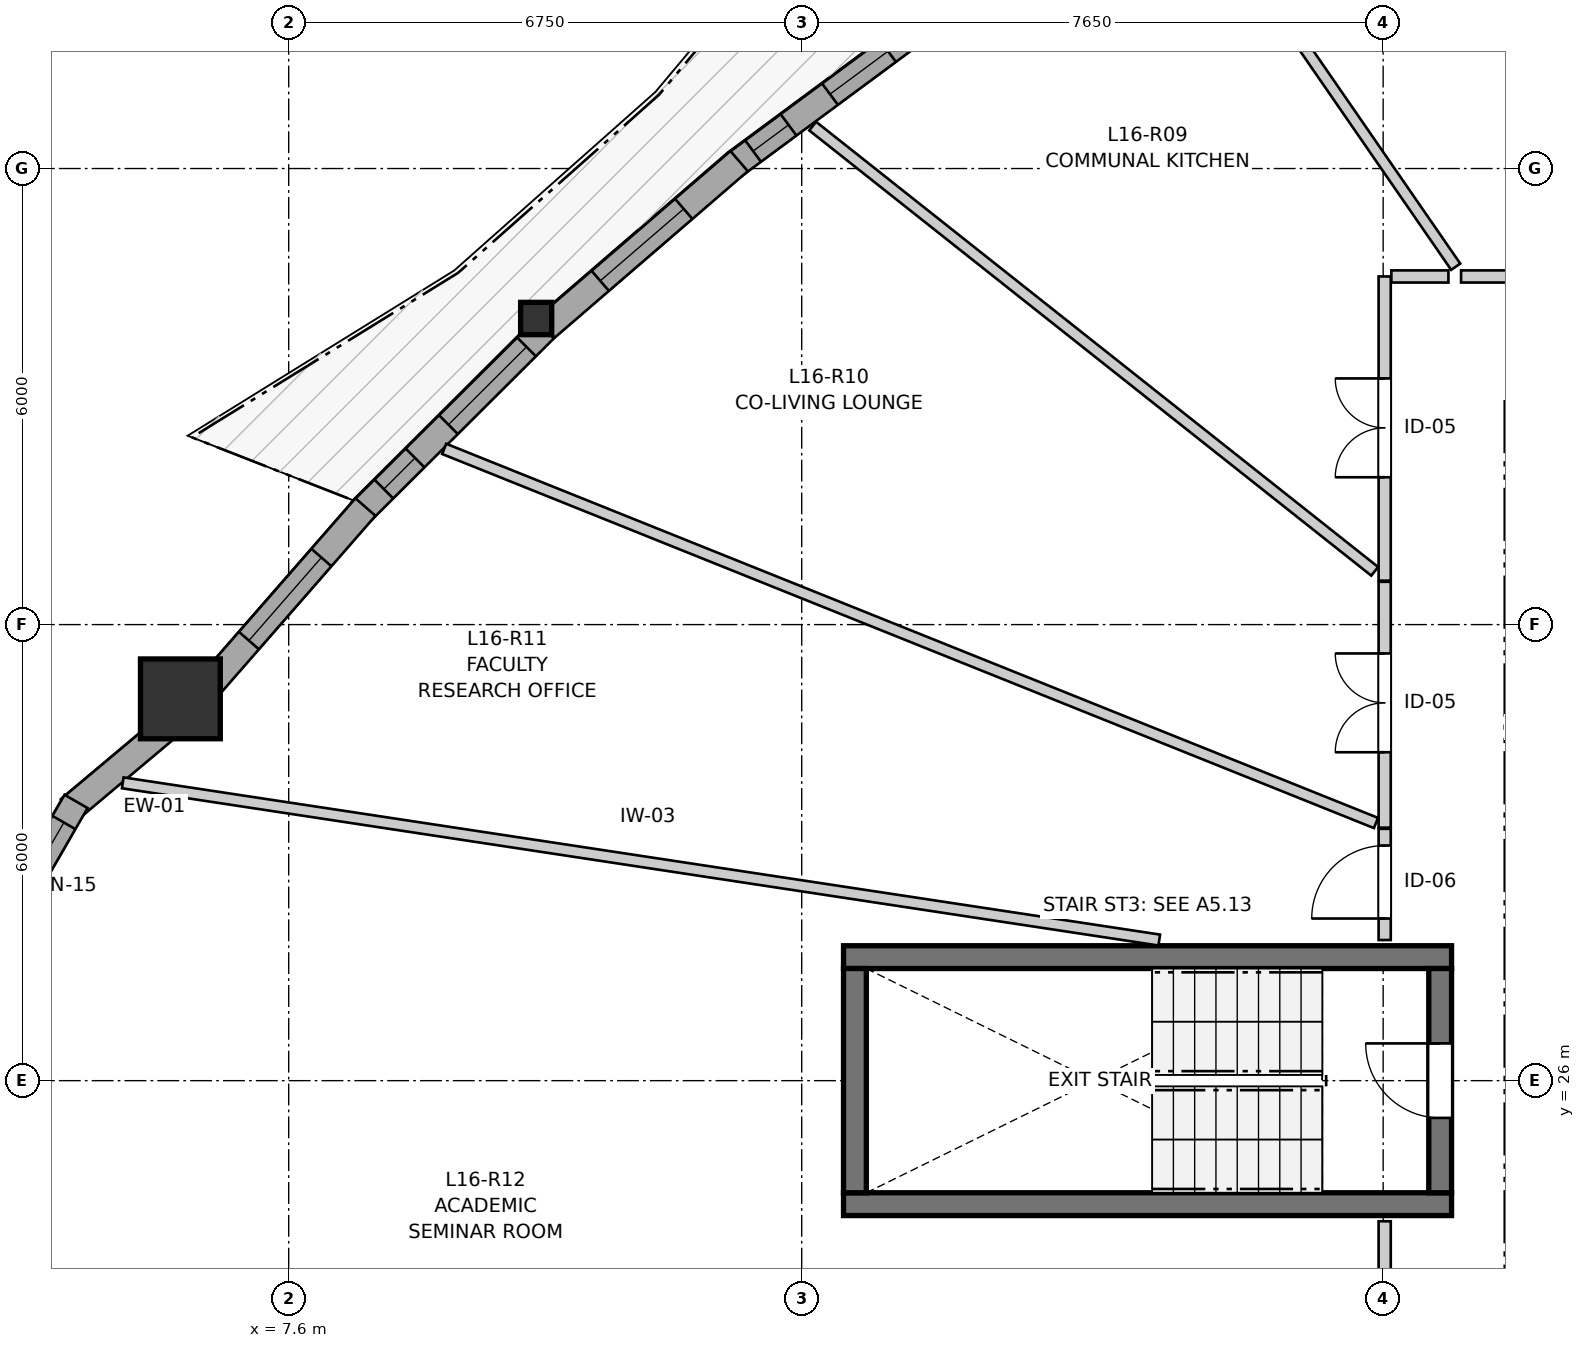
"""IFC4 building model, lengths in metres.
Left out: names, types, materials, properties, quantities, classifications, styles, units other than length and angle.
Written with IfcOpenShell. Run it as: python <this file> out.ifc"""

import sys

from ifc_helpers import new_model, si_unit, direction, frame, frame_2d, origin, origin_2d, place, context, subcontext, project, spatial, rectangle, i_section, extrude, source, transform, mapped, element, fill, save


model = new_model("IFC4")
c1 = context("Model", 3, precision=1e-05, world=origin(), true_north=direction((0.0, 1.0)))
c2 = subcontext(c1, "Body", "Model", "MODEL_VIEW")
j1 = project(units=[si_unit("LENGTHUNIT", "METRE"), si_unit("PLANEANGLEUNIT", "RADIAN")], contexts=[c1])
p1 = place(None, origin())
s1 = spatial("IfcSite", under=j1, at=p1, CompositionType="ELEMENT")
p2 = place(p1, origin())
s2 = spatial("IfcBuilding", under=s1, at=p2, CompositionType="ELEMENT")
p3 = place(p2, frame((0.0, 0.0, 55.8)))
s3 = spatial("IfcBuildingStorey", under=s2, at=p3, CompositionType="ELEMENT", Elevation=55.8)
for number, where, z_axis, x_axis in (
    (1, (14.9, 24.375, 0.0), (0.0, 0.0, 1.0), (1.0, 0.0, 0.0)),
    (2, (22.9, 27.625, 0.0), (0.0, 0.0, 1.0), (-1.0, 0.0, 0.0)),
):
    element("IfcWall", number, at=place(p3, frame(where, z_axis=z_axis, x_axis=x_axis)), inside=s3, PredefinedType="SHEAR", context=c2, shape_type="SweptSolid", body=[
        extrude(rectangle(XDim=8.0, YDim=0.3, at=frame_2d((4.0, 0.0))), origin(), (0.0, 0.0, 1.0), 2.94),
    ])
p4 = place(p3, frame((15.05, 27.475, 0.0), z_axis=(0.0, 0.0, 1.0), x_axis=(0.0, -1.0, 0.0)))
e3 = element("IfcWall", 3, at=p4, inside=s3, PredefinedType="SHEAR", context=c2, shape_type="SweptSolid", body=[
    extrude(rectangle(XDim=2.95, YDim=0.3, at=frame_2d((1.475, 0.0))), origin(), (0.0, 0.0, 1.0), 2.94),
])
p5 = place(p3, frame((22.75, 24.525, 0.0), z_axis=(0.0, 0.0, 1.0), x_axis=(0.0, 1.0, 0.0)))
e4 = element("IfcWall", 4, at=p5, inside=s3, PredefinedType="SHEAR", context=c2, shape_type="SweptSolid", body=[
    extrude(rectangle(XDim=2.95, YDim=0.3, at=frame_2d((1.475, 0.0))), origin(), (0.0, 0.0, 1.0), 2.94),
])
p6 = place(p5, frame((0.985, 0.0, 0.0)))
e5 = element("IfcOpeningElement", 5, at=p6, cuts=e4, PredefinedType="OPENING", context=c2, shape_type="SweptSolid", body=[
    extrude(rectangle(XDim=0.98, YDim=2.15, at=frame_2d((0.49, 1.075))), frame((0.0, 0.16, 0.0), z_axis=(0.0, -1.0, 0.0), x_axis=(1.0, 0.0, 0.0)), (0.0, 0.0, 1.0), 0.32),
])
m1 = source(origin(), c2, "Body", "SweptSolid", [
    extrude(rectangle(XDim=1.05, YDim=1.05, at=origin_2d()), origin(), (0.0, 0.0, 1.0), 2.94),
])
p7 = place(p3, frame((6.175, 31.023, 0.0), z_axis=(0.0, 0.0, 1.0), x_axis=(1.0, 0.0, 0.0)))
e6 = element("IfcColumn", 6, at=p7, inside=s3, PredefinedType="COLUMN", context=c2, shape_type="MappedRepresentation", body=[
    mapped(m1, transform((0.0, 0.0, 0.0), x_axis=(1.0, 0.0, 0.0), y_axis=(0.0, 1.0, 0.0), z_axis=(0.0, 0.0, 1.0), scale=1.0)),
])
m2 = source(origin(), c2, "Body", "SweptSolid", [
    extrude(i_section(OverallWidth=0.409, OverallDepth=0.425, WebThickness=0.03, FlangeThickness=0.048, FilletRadius=0.015, at=origin_2d()), origin(), (0.0, 0.0, 1.0), 2.94),
])
p8 = place(p3, frame((10.856, 36.027, 0.0), z_axis=(0.0, 0.0, 1.0), x_axis=(1.0, 0.0, 0.0)))
e7 = element("IfcColumn", 7, at=p8, inside=s3, PredefinedType="PILASTER", context=c2, shape_type="MappedRepresentation", body=[
    mapped(m2, transform((0.0, 0.0, 0.0), x_axis=(1.0, 0.0, 0.0), y_axis=(0.0, 1.0, 0.0), z_axis=(0.0, 0.0, 1.0), scale=1.0)),
])
p9 = place(p3, frame((6.058, 30.696, 0.0), z_axis=(0.0, 0.0, 1.0), x_axis=(-0.766001205563, -0.64283913468, 0.0)))
e8 = element("IfcWall", 8, at=p9, inside=s3, PredefinedType="SOLIDWALL", context=c2, shape_type="SweptSolid", body=[
    extrude(rectangle(XDim=1.752, YDim=0.35, at=frame_2d((0.876, 0.0))), origin(), (0.0, 0.0, 1.0), 2.42),
])
p10 = place(p3, frame((4.802, 29.674, 0.0), z_axis=(0.0, 0.0, 1.0), x_axis=(-0.499995423472, -0.866028046028, 0.0)))
e9 = element("IfcWall", 9, at=p10, inside=s3, PredefinedType="SOLIDWALL", context=c2, shape_type="SweptSolid", body=[
    extrude(rectangle(XDim=2.09, YDim=0.35, at=frame_2d((1.045, 0.0))), origin(), (0.0, 0.0, 1.0), 2.42),
])
p11 = place(p10, frame((0.32, 0.0, 0.82)))
e10 = element("IfcOpeningElement", 10, at=p11, cuts=e9, PredefinedType="OPENING", context=c2, shape_type="SweptSolid", body=[
    extrude(rectangle(XDim=1.45, YDim=1.25, at=frame_2d((0.725, 0.625))), frame((0.0, 0.185, 0.0), z_axis=(0.0, -1.0, 0.0), x_axis=(1.0, 0.0, 0.0)), (0.0, 0.0, 1.0), 0.37),
])
p12 = place(p3, frame((3.757, 24.137, 0.0), z_axis=(0.0, 0.0, 1.0), x_axis=(0.499995423472, -0.866028046028, 0.0)))
e11 = element("IfcWall", 11, at=p12, inside=s3, PredefinedType="SOLIDWALL", context=c2, shape_type="SweptSolid", body=[
    extrude(rectangle(XDim=2.09, YDim=0.35, at=frame_2d((1.045, 0.0))), origin(), (0.0, 0.0, 1.0), 2.42),
])
p13 = place(p12, frame((0.32, 0.0, 0.82)))
e12 = element("IfcOpeningElement", 12, at=p13, cuts=e11, PredefinedType="OPENING", context=c2, shape_type="SweptSolid", body=[
    extrude(rectangle(XDim=1.45, YDim=1.25, at=frame_2d((0.725, 0.625))), frame((0.0, 0.185, 0.0), z_axis=(0.0, -1.0, 0.0), x_axis=(1.0, 0.0, 0.0)), (0.0, 0.0, 1.0), 0.37),
])
p14 = place(p3, frame((15.898, 39.849, 0.0), z_axis=(0.0, 0.0, 1.0), x_axis=(-0.803775013519, -0.594933380844, 0.0)))
e13 = element("IfcWall", 13, at=p14, inside=s3, PredefinedType="SOLIDWALL", context=c2, shape_type="SweptSolid", body=[
    extrude(rectangle(XDim=3.037, YDim=0.35, at=frame_2d((1.519, 0.0))), origin(), (0.0, 0.0, 1.0), 2.42),
])
p15 = place(p14, frame((0.513, 0.0, 0.82)))
e14 = element("IfcOpeningElement", 14, at=p15, cuts=e13, PredefinedType="OPENING", context=c2, shape_type="SweptSolid", body=[
    extrude(rectangle(XDim=0.95, YDim=1.35, at=frame_2d((0.475, 0.675))), frame((0.0, 0.185, 0.0), z_axis=(0.0, -1.0, 0.0), x_axis=(1.0, 0.0, 0.0)), (0.0, 0.0, 1.0), 0.37),
])
p16 = place(p14, frame((2.142, 0.0, 0.82)))
e15 = element("IfcOpeningElement", 15, at=p16, cuts=e13, PredefinedType="OPENING", context=c2, shape_type="SweptSolid", body=[
    extrude(rectangle(XDim=0.58, YDim=1.35, at=frame_2d((0.29, 0.675))), frame((0.0, 0.185, 0.0), z_axis=(0.0, -1.0, 0.0), x_axis=(1.0, 0.0, 0.0)), (0.0, 0.0, 1.0), 0.37),
])
p17 = place(p3, frame((13.526, 38.097, 0.0), z_axis=(0.0, 0.0, 1.0), x_axis=(-0.757460843483, -0.652880594435, 0.0)))
e16 = element("IfcWall", 16, at=p17, inside=s3, PredefinedType="SOLIDWALL", context=c2, shape_type="SweptSolid", body=[
    extrude(rectangle(XDim=3.355, YDim=0.35, at=frame_2d((1.677, 0.0))), origin(), (0.0, 0.0, 1.0), 2.42),
])
p18 = place(p17, frame((0.962, 0.0, 0.82)))
e17 = element("IfcOpeningElement", 17, at=p18, cuts=e16, PredefinedType="OPENING", context=c2, shape_type="SweptSolid", body=[
    extrude(rectangle(XDim=1.45, YDim=1.25, at=frame_2d((0.725, 0.625))), frame((0.0, 0.185, 0.0), z_axis=(0.0, -1.0, 0.0), x_axis=(1.0, 0.0, 0.0)), (0.0, 0.0, 1.0), 0.37),
])
p19 = place(p3, frame((10.965, 35.889, 0.0), z_axis=(0.0, 0.0, 1.0), x_axis=(-0.708394377581, -0.70581683588, 0.0)))
e18 = element("IfcWall", 18, at=p19, inside=s3, PredefinedType="SOLIDWALL", context=c2, shape_type="SweptSolid", body=[
    extrude(rectangle(XDim=3.41, YDim=0.35, at=frame_2d((1.705, 0.0))), origin(), (0.0, 0.0, 1.0), 2.42),
])
p20 = place(p19, frame((0.333, 0.0, 0.82)))
e19 = element("IfcOpeningElement", 19, at=p20, cuts=e18, PredefinedType="OPENING", context=c2, shape_type="SweptSolid", body=[
    extrude(rectangle(XDim=1.45, YDim=1.25, at=frame_2d((0.725, 0.625))), frame((0.0, 0.185, 0.0), z_axis=(0.0, -1.0, 0.0), x_axis=(1.0, 0.0, 0.0)), (0.0, 0.0, 1.0), 0.37),
])
p21 = place(p19, frame((2.403, 0.0, 0.82)))
e20 = element("IfcOpeningElement", 20, at=p21, cuts=e18, PredefinedType="OPENING", context=c2, shape_type="SweptSolid", body=[
    extrude(rectangle(XDim=0.58, YDim=1.35, at=frame_2d((0.29, 0.675))), frame((0.0, 0.185, 0.0), z_axis=(0.0, -1.0, 0.0), x_axis=(1.0, 0.0, 0.0)), (0.0, 0.0, 1.0), 0.37),
])
p22 = place(p3, frame((8.61, 33.546, 0.0), z_axis=(0.0, 0.0, 1.0), x_axis=(-0.657608204376, -0.753360106149, 0.0)))
e21 = element("IfcWall", 21, at=p22, inside=s3, PredefinedType="SOLIDWALL", context=c2, shape_type="SweptSolid", body=[
    extrude(rectangle(XDim=3.202, YDim=0.35, at=frame_2d((1.601, 0.0))), origin(), (0.0, 0.0, 1.0), 2.42),
])
p23 = place(p22, frame((0.881, 0.0, 0.82)))
e22 = element("IfcOpeningElement", 22, at=p23, cuts=e21, PredefinedType="OPENING", context=c2, shape_type="SweptSolid", body=[
    extrude(rectangle(XDim=1.45, YDim=1.25, at=frame_2d((0.725, 0.625))), frame((0.0, 0.185, 0.0), z_axis=(0.0, -1.0, 0.0), x_axis=(1.0, 0.0, 0.0)), (0.0, 0.0, 1.0), 0.37),
])
p24 = place(p3, frame((23.025, 36.58, 0.0), z_axis=(0.0, 0.0, 1.0), x_axis=(1.0, 0.0, 0.0)))
e23 = element("IfcWall", 23, at=p24, inside=s3, PredefinedType="PARTITIONING", context=c2, shape_type="SweptSolid", body=[
    extrude(rectangle(XDim=4.152, YDim=0.16, at=frame_2d((2.076, 0.0))), origin(), (0.0, 0.0, 1.0), 2.548),
])
p25 = place(p24, frame((1.64, 0.0, 0.0)))
e24 = element("IfcOpeningElement", 24, at=p25, cuts=e23, PredefinedType="OPENING", context=c2, shape_type="SweptSolid", body=[
    extrude(rectangle(XDim=0.92, YDim=2.1, at=frame_2d((0.46, 1.05))), frame((0.0, 0.09, 0.0), z_axis=(0.0, -1.0, 0.0), x_axis=(1.0, 0.0, 0.0)), (0.0, 0.0, 1.0), 0.18),
])
p26 = place(p3, frame((22.02, 32.578, 0.0), z_axis=(0.0, 0.0, 1.0), x_axis=(0.0, 1.0, 0.0)))
e25 = element("IfcWall", 25, at=p26, inside=s3, PredefinedType="PARTITIONING", context=c2, shape_type="SweptSolid", body=[
    extrude(rectangle(XDim=4.002, YDim=0.16, at=frame_2d((2.001, 0.0))), origin(), (0.0, 0.0, 1.0), 2.94),
])
p27 = place(p26, frame((1.361, 0.0, 0.0)))
e26 = element("IfcOpeningElement", 26, at=p27, cuts=e25, PredefinedType="OPENING", context=c2, shape_type="SweptSolid", body=[
    extrude(rectangle(XDim=1.3, YDim=2.1, at=frame_2d((0.65, 1.05))), frame((0.0, 0.09, 0.0), z_axis=(0.0, -1.0, 0.0), x_axis=(1.0, 0.0, 0.0)), (0.0, 0.0, 1.0), 0.18),
])
p28 = place(p3, frame((22.02, 29.328, 0.0), z_axis=(0.0, 0.0, 1.0), x_axis=(0.0, 1.0, 0.0)))
e27 = element("IfcWall", 27, at=p28, inside=s3, PredefinedType="PARTITIONING", context=c2, shape_type="SweptSolid", body=[
    extrude(rectangle(XDim=3.235, YDim=0.16, at=frame_2d((1.618, 0.0))), origin(), (0.0, 0.0, 1.0), 2.94),
])
p29 = place(p28, frame((0.992, 0.0, 0.0)))
e28 = element("IfcOpeningElement", 28, at=p29, cuts=e27, PredefinedType="OPENING", context=c2, shape_type="SweptSolid", body=[
    extrude(rectangle(XDim=1.3, YDim=2.1, at=frame_2d((0.65, 1.05))), frame((0.0, 0.09, 0.0), z_axis=(0.0, -1.0, 0.0), x_axis=(1.0, 0.0, 0.0)), (0.0, 0.0, 1.0), 0.18),
])
p30 = place(p3, frame((22.02, 21.168, 0.0), z_axis=(0.0, 0.0, 1.0), x_axis=(0.0, 1.0, 0.0)))
e29 = element("IfcWall", 29, at=p30, inside=s3, PredefinedType="PARTITIONING", context=c2, shape_type="SweptSolid", body=[
    extrude(rectangle(XDim=2.982, YDim=0.16, at=frame_2d((1.491, 0.0))), origin(), (0.0, 0.0, 1.0), 2.94),
])
p31 = place(p30, frame((0.887, 0.0, 0.0)))
e30 = element("IfcOpeningElement", 30, at=p31, cuts=e29, PredefinedType="OPENING", context=c2, shape_type="SweptSolid", body=[
    extrude(rectangle(XDim=1.3, YDim=2.1, at=frame_2d((0.65, 1.05))), frame((0.0, 0.09, 0.0), z_axis=(0.0, -1.0, 0.0), x_axis=(1.0, 0.0, 0.0)), (0.0, 0.0, 1.0), 0.18),
])
p32 = place(p3, frame((22.02, 27.85, 0.0), z_axis=(0.0, 0.0, 1.0), x_axis=(0.0, 1.0, 0.0)))
e31 = element("IfcWall", 31, at=p32, inside=s3, PredefinedType="PARTITIONING", context=c2, shape_type="SweptSolid", body=[
    extrude(rectangle(XDim=1.463, YDim=0.16, at=frame_2d((0.731, 0.0))), origin(), (0.0, 0.0, 1.0), 2.94),
])
p33 = place(p32, frame((0.283, 0.0, 0.0)))
e32 = element("IfcOpeningElement", 32, at=p33, cuts=e31, PredefinedType="OPENING", context=c2, shape_type="SweptSolid", body=[
    extrude(rectangle(XDim=0.96, YDim=2.1, at=frame_2d((0.48, 1.05))), frame((0.0, 0.09, 0.0), z_axis=(0.0, -1.0, 0.0), x_axis=(1.0, 0.0, 0.0)), (0.0, 0.0, 1.0), 0.18),
])
p34 = place(p3, frame((5.417, 29.918, 0.0), z_axis=(0.0, 0.0, 1.0), x_axis=(0.98869499802, -0.149940657898, 0.0)))
e33 = element("IfcWall", 33, at=p34, inside=s3, PredefinedType="PARTITIONING", context=c2, shape_type="SweptSolid", body=[
    extrude(rectangle(XDim=13.793, YDim=0.145, at=frame_2d((6.896, 0.0))), origin(), (0.0, 0.0, 1.0), 2.94),
])
p35 = place(p3, frame((9.646, 34.312, 0.0), z_axis=(0.0, 0.0, 1.0), x_axis=(0.928010757454, -0.372553397581, 0.0)))
e34 = element("IfcWall", 34, at=p35, inside=s3, PredefinedType="PARTITIONING", context=c2, shape_type="SweptSolid", body=[
    extrude(rectangle(XDim=13.21, YDim=0.145, at=frame_2d((6.605, 0.0))), origin(), (0.0, 0.0, 1.0), 2.94),
])
p36 = place(p3, frame((14.494, 38.558, 0.0), z_axis=(0.0, 0.0, 1.0), x_axis=(0.783879440631, -0.620913055552, 0.0)))
e35 = element("IfcWall", 35, at=p36, inside=s3, PredefinedType="PARTITIONING", context=c2, shape_type="SweptSolid", body=[
    extrude(rectangle(XDim=9.434, YDim=0.145, at=frame_2d((4.717, 0.0))), origin(), (0.0, 0.0, 1.0), 2.94),
])
p37 = place(p3, frame((19.423, 41.823, 0.0), z_axis=(0.0, 0.0, 1.0), x_axis=(0.568159686118, -0.822918325881, 0.0)))
e36 = element("IfcWall", 36, at=p37, inside=s3, PredefinedType="PARTITIONING", context=c2, shape_type="SweptSolid", body=[
    extrude(rectangle(XDim=6.216, YDim=0.145, at=frame_2d((3.108, 0.0))), origin(), (0.0, 0.0, 1.0), 2.94),
])
p38 = place(p3, frame((22.108, 36.58, 0.0), z_axis=(0.0, 0.0, 1.0), x_axis=(1.0, 0.0, 0.0)))
e37 = element("IfcWall", 37, at=p38, inside=s3, PredefinedType="PARTITIONING", context=c2, shape_type="SweptSolid", body=[
    extrude(rectangle(XDim=0.751, YDim=0.16, at=frame_2d((0.375, 0.0))), origin(), (0.0, 0.0, 1.0), 2.94),
])
m3 = source(origin(), c2, "Body", "SweptSolid", [
    extrude(rectangle(XDim=1.45, YDim=1.25, at=frame_2d((0.725, 0.625))), frame((0.0, 0.03, 0.0), z_axis=(0.0, -1.0, 0.0), x_axis=(1.0, 0.0, 0.0)), (0.0, 0.0, 1.0), 0.06),
])
p39 = place(p11, origin())
e38 = element("IfcWindow", 38, at=p39, inside=s3, PartitioningType="SINGLE_PANEL", PredefinedType="WINDOW", context=c2, shape_type="MappedRepresentation", body=[
    mapped(m3, transform((0.0, 0.0, 0.0), x_axis=(1.0, 0.0, 0.0), y_axis=(0.0, 1.0, 0.0), z_axis=(0.0, 0.0, 1.0), scale=1.0)),
])
fill(e10, e38)
p40 = place(p13, origin())
e39 = element("IfcWindow", 39, at=p40, inside=s3, PartitioningType="SINGLE_PANEL", PredefinedType="WINDOW", context=c2, shape_type="MappedRepresentation", body=[
    mapped(m3, transform((0.0, 0.0, 0.0), x_axis=(1.0, 0.0, 0.0), y_axis=(0.0, 1.0, 0.0), z_axis=(0.0, 0.0, 1.0), scale=1.0)),
])
fill(e12, e39)
m4 = source(origin(), c2, "Body", "SweptSolid", [
    extrude(rectangle(XDim=0.95, YDim=1.35, at=frame_2d((0.475, 0.675))), frame((0.0, 0.03, 0.0), z_axis=(0.0, -1.0, 0.0), x_axis=(1.0, 0.0, 0.0)), (0.0, 0.0, 1.0), 0.06),
])
p41 = place(p15, origin())
e40 = element("IfcWindow", 40, at=p41, inside=s3, PartitioningType="SINGLE_PANEL", PredefinedType="WINDOW", context=c2, shape_type="MappedRepresentation", body=[
    mapped(m4, transform((0.0, 0.0, 0.0), x_axis=(1.0, 0.0, 0.0), y_axis=(0.0, 1.0, 0.0), z_axis=(0.0, 0.0, 1.0), scale=1.0)),
])
fill(e14, e40)
m5 = source(origin(), c2, "Body", "SweptSolid", [
    extrude(rectangle(XDim=0.58, YDim=1.35, at=frame_2d((0.29, 0.675))), frame((0.0, 0.03, 0.0), z_axis=(0.0, -1.0, 0.0), x_axis=(1.0, 0.0, 0.0)), (0.0, 0.0, 1.0), 0.06),
])
p42 = place(p16, origin())
e41 = element("IfcWindow", 41, at=p42, inside=s3, PartitioningType="SINGLE_PANEL", PredefinedType="WINDOW", context=c2, shape_type="MappedRepresentation", body=[
    mapped(m5, transform((0.0, 0.0, 0.0), x_axis=(1.0, 0.0, 0.0), y_axis=(0.0, 1.0, 0.0), z_axis=(0.0, 0.0, 1.0), scale=1.0)),
])
fill(e15, e41)
p43 = place(p18, origin())
e42 = element("IfcWindow", 42, at=p43, inside=s3, PartitioningType="SINGLE_PANEL", PredefinedType="WINDOW", context=c2, shape_type="MappedRepresentation", body=[
    mapped(m3, transform((0.0, 0.0, 0.0), x_axis=(1.0, 0.0, 0.0), y_axis=(0.0, 1.0, 0.0), z_axis=(0.0, 0.0, 1.0), scale=1.0)),
])
fill(e17, e42)
p44 = place(p20, origin())
e43 = element("IfcWindow", 43, at=p44, inside=s3, PartitioningType="SINGLE_PANEL", PredefinedType="WINDOW", context=c2, shape_type="MappedRepresentation", body=[
    mapped(m3, transform((0.0, 0.0, 0.0), x_axis=(1.0, 0.0, 0.0), y_axis=(0.0, 1.0, 0.0), z_axis=(0.0, 0.0, 1.0), scale=1.0)),
])
fill(e19, e43)
p45 = place(p21, origin())
e44 = element("IfcWindow", 44, at=p45, inside=s3, PartitioningType="SINGLE_PANEL", PredefinedType="WINDOW", context=c2, shape_type="MappedRepresentation", body=[
    mapped(m5, transform((0.0, 0.0, 0.0), x_axis=(1.0, 0.0, 0.0), y_axis=(0.0, 1.0, 0.0), z_axis=(0.0, 0.0, 1.0), scale=1.0)),
])
fill(e20, e44)
p46 = place(p23, origin())
e45 = element("IfcWindow", 45, at=p46, inside=s3, PartitioningType="SINGLE_PANEL", PredefinedType="WINDOW", context=c2, shape_type="MappedRepresentation", body=[
    mapped(m3, transform((0.0, 0.0, 0.0), x_axis=(1.0, 0.0, 0.0), y_axis=(0.0, 1.0, 0.0), z_axis=(0.0, 0.0, 1.0), scale=1.0)),
])
fill(e22, e45)
m6 = source(origin(), c2, "Body", "SweptSolid", [
    extrude(rectangle(XDim=0.98, YDim=2.15, at=frame_2d((0.49, 1.075))), frame((0.0, 0.025, 0.0), z_axis=(0.0, -1.0, 0.0), x_axis=(1.0, 0.0, 0.0)), (0.0, 0.0, 1.0), 0.05),
])
p47 = place(p6, origin())
e46 = element("IfcDoor", 46, at=p47, inside=s3, OperationType="SINGLE_SWING_RIGHT", PredefinedType="DOOR", context=c2, shape_type="MappedRepresentation", body=[
    mapped(m6, transform((0.0, 0.0, 0.0), x_axis=(1.0, 0.0, 0.0), y_axis=(0.0, 1.0, 0.0), z_axis=(0.0, 0.0, 1.0), scale=1.0)),
])
fill(e5, e46)
m7 = source(origin(), c2, "Body", "SweptSolid", [
    extrude(rectangle(XDim=1.3, YDim=2.1, at=frame_2d((0.65, 1.05))), frame((0.0, 0.025, 0.0), z_axis=(0.0, -1.0, 0.0), x_axis=(1.0, 0.0, 0.0)), (0.0, 0.0, 1.0), 0.05),
])
p48 = place(p27, origin())
e47 = element("IfcDoor", 47, at=p48, inside=s3, OperationType="DOUBLE_DOOR_SINGLE_SWING", PredefinedType="DOOR", context=c2, shape_type="MappedRepresentation", body=[
    mapped(m7, transform((0.0, 0.0, 0.0), x_axis=(1.0, 0.0, 0.0), y_axis=(0.0, 1.0, 0.0), z_axis=(0.0, 0.0, 1.0), scale=1.0)),
])
fill(e26, e47)
p49 = place(p29, origin())
e48 = element("IfcDoor", 48, at=p49, inside=s3, OperationType="DOUBLE_DOOR_SINGLE_SWING", PredefinedType="DOOR", context=c2, shape_type="MappedRepresentation", body=[
    mapped(m7, transform((0.0, 0.0, 0.0), x_axis=(1.0, 0.0, 0.0), y_axis=(0.0, 1.0, 0.0), z_axis=(0.0, 0.0, 1.0), scale=1.0)),
])
fill(e28, e48)
m8 = source(origin(), c2, "Body", "SweptSolid", [
    extrude(rectangle(XDim=0.96, YDim=2.1, at=frame_2d((0.48, 1.05))), frame((0.0, 0.025, 0.0), z_axis=(0.0, -1.0, 0.0), x_axis=(1.0, 0.0, 0.0)), (0.0, 0.0, 1.0), 0.05),
])
p50 = place(p33, origin())
e49 = element("IfcDoor", 49, at=p50, inside=s3, OperationType="SINGLE_SWING_LEFT", PredefinedType="DOOR", context=c2, shape_type="MappedRepresentation", body=[
    mapped(m8, transform((0.0, 0.0, 0.0), x_axis=(1.0, 0.0, 0.0), y_axis=(0.0, 1.0, 0.0), z_axis=(0.0, 0.0, 1.0), scale=1.0)),
])
fill(e32, e49)
save(model, sys.argv[1])
